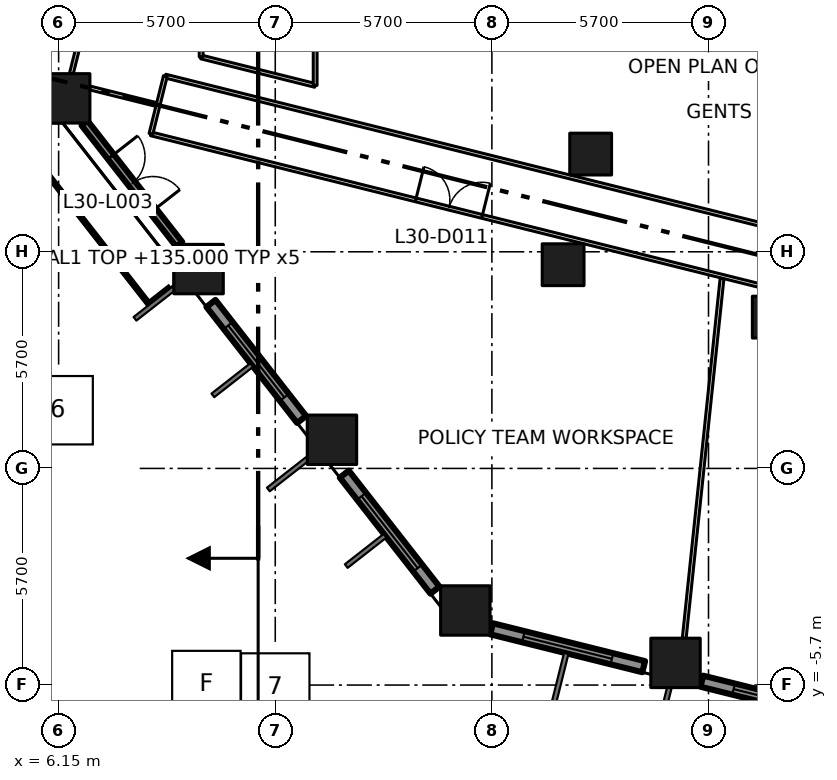
"""IFC4 building model, lengths in metres.
Left out: names, types, materials, properties, quantities, classifications, styles, units other than length and angle.
Written with IfcOpenShell. Run it as: python <this file> out.ifc"""

import sys

from ifc_helpers import new_model, si_unit, direction, frame, frame_2d, origin, origin_2d, place, context, subcontext, project, spatial, rectangle, extrude, element, fill, save


model = new_model("IFC4")
c1 = context("Model", 3, precision=1e-05, world=origin(), true_north=direction((0.0, 1.0)))
c2 = subcontext(c1, "Body", "Model", "MODEL_VIEW")
j1 = project(units=[si_unit("LENGTHUNIT", "METRE"), si_unit("PLANEANGLEUNIT", "RADIAN")], contexts=[c1])
p1 = place(None, origin())
s1 = spatial("IfcSite", under=j1, at=p1, CompositionType="ELEMENT")
p2 = place(p1, origin())
s2 = spatial("IfcBuilding", under=s1, at=p2, CompositionType="ELEMENT")
p3 = place(p2, frame((0.0, 0.0, 135.0)))
s3 = spatial("IfcBuildingStorey", under=s2, at=p3, CompositionType="ELEMENT", Elevation=135.0)
for number, where, z_axis, x_axis in (
    (1, (16.851, -3.738, 0.0), (0.0, 0.0, 1.0), (1.0, 0.0, 0.0)),
    (2, (13.342, 0.754, 0.0), (0.0, 0.0, 1.0), (1.0, 0.0, 0.0)),
    (3, (9.833, 5.245, 0.0), (0.0, 0.0, 1.0), (1.0, 0.0, 0.0)),
    (4, (6.323, 9.737, 0.0), (0.0, 0.0, 1.0), (1.0, 0.0, 0.0)),
    (5, (22.382, -5.117, 0.0), (0.0, 0.0, 1.0), (1.0, 0.0, 0.0)),
):
    element("IfcColumn", number, at=place(p3, frame(where, z_axis=z_axis, x_axis=x_axis)), inside=s3, PredefinedType="COLUMN", context=c2, shape_type="SweptSolid", body=[
        extrude(rectangle(XDim=1.3, YDim=1.3, at=origin_2d()), origin(), (0.0, 0.0, 1.0), 4.2),
    ])
for number, where, z_axis, x_axis in (
    (6, (19.424, 5.36, 0.0), (0.0, 0.0, 1.0), (1.0, 0.0, 0.0)),
    (7, (24.954, 3.981, 0.0), (0.0, 0.0, 1.0), (1.0, 0.0, 0.0)),
    (8, (20.149, 8.271, 0.0), (0.0, 0.0, 1.0), (1.0, 0.0, 0.0)),
):
    element("IfcColumn", number, at=place(p3, frame(where, z_axis=z_axis, x_axis=x_axis)), inside=s3, PredefinedType="COLUMN", context=c2, shape_type="SweptSolid", body=[
        extrude(rectangle(XDim=1.1, YDim=1.1, at=origin_2d()), origin(), (0.0, 0.0, 1.0), 4.2),
    ])
p4 = place(p3, frame((6.832, 9.087, 0.0), z_axis=(0.0, 0.0, 1.0), x_axis=(0.615529395526, -0.788113927833, 0.0)))
e9 = element("IfcWall", 9, at=p4, inside=s3, PredefinedType="SOLIDWALL", context=c2, shape_type="SweptSolid", body=[
    extrude(rectangle(XDim=4.05, YDim=0.2, at=frame_2d((2.025, 0.0))), origin(), (0.0, 0.0, 1.0), 3.1),
])
p5 = place(p4, frame((1.125, 0.0, 0.0)))
e10 = element("IfcOpeningElement", 10, at=p5, cuts=e9, PredefinedType="OPENING", context=c2, shape_type="SweptSolid", body=[
    extrude(rectangle(XDim=1.8, YDim=2.9, at=frame_2d((0.9, 1.45))), frame((0.0, 0.11, 0.0), z_axis=(0.0, -1.0, 0.0), x_axis=(1.0, 0.0, 0.0)), (0.0, 0.0, 1.0), 0.22),
])
p6 = place(p3, frame((10.158, 4.341, 0.0), z_axis=(0.0, 0.0, 1.0), x_axis=(0.615779754703, -0.787918329332, 0.0)))
e11 = element("IfcWall", 11, at=p6, inside=s3, PredefinedType="SOLIDWALL", context=c2, shape_type="SweptSolid", body=[
    extrude(rectangle(XDim=3.875, YDim=0.3, at=frame_2d((1.938, 0.0))), origin(), (0.0, 0.0, 1.0), 3.1),
])
p7 = place(p6, frame((0.737, 0.0, 0.8)))
e12 = element("IfcOpeningElement", 12, at=p7, cuts=e11, PredefinedType="OPENING", context=c2, shape_type="SweptSolid", body=[
    extrude(rectangle(XDim=2.4, YDim=2.1, at=frame_2d((1.2, 1.05))), frame((0.0, 0.16, 0.0), z_axis=(0.0, -1.0, 0.0), x_axis=(1.0, 0.0, 0.0)), (0.0, 0.0, 1.0), 0.32),
])
p8 = place(p3, frame((13.667, -0.15, 0.0), z_axis=(0.0, 0.0, 1.0), x_axis=(0.615626928003, -0.788037743714, 0.0)))
e13 = element("IfcWall", 13, at=p8, inside=s3, PredefinedType="SOLIDWALL", context=c2, shape_type="SweptSolid", body=[
    extrude(rectangle(XDim=3.876, YDim=0.3, at=frame_2d((1.938, 0.0))), origin(), (0.0, 0.0, 1.0), 3.1),
])
p9 = place(p8, frame((0.738, 0.0, 0.8)))
e14 = element("IfcOpeningElement", 14, at=p9, cuts=e13, PredefinedType="OPENING", context=c2, shape_type="SweptSolid", body=[
    extrude(rectangle(XDim=2.4, YDim=2.1, at=frame_2d((1.2, 1.05))), frame((0.0, 0.16, 0.0), z_axis=(0.0, -1.0, 0.0), x_axis=(1.0, 0.0, 0.0)), (0.0, 0.0, 1.0), 0.32),
])
p10 = place(p3, frame((17.543, -4.22, 0.0), z_axis=(0.0, 0.0, 1.0), x_axis=(0.970337184445, -0.241755555227, 0.0)))
e15 = element("IfcWall", 15, at=p10, inside=s3, PredefinedType="SOLIDWALL", context=c2, shape_type="SweptSolid", body=[
    extrude(rectangle(XDim=4.124, YDim=0.3, at=frame_2d((2.062, 0.0))), origin(), (0.0, 0.0, 1.0), 3.1),
])
p11 = place(p10, frame((0.862, 0.0, 0.8)))
e16 = element("IfcOpeningElement", 16, at=p11, cuts=e15, PredefinedType="OPENING", context=c2, shape_type="SweptSolid", body=[
    extrude(rectangle(XDim=2.4, YDim=2.1, at=frame_2d((1.2, 1.05))), frame((0.0, 0.16, 0.0), z_axis=(0.0, -1.0, 0.0), x_axis=(1.0, 0.0, 0.0)), (0.0, 0.0, 1.0), 0.32),
])
p12 = place(p3, frame((23.074, -5.598, 0.0), z_axis=(0.0, 0.0, 1.0), x_axis=(0.970267747908, -0.242034083076, 0.0)))
e17 = element("IfcWall", 17, at=p12, inside=s3, PredefinedType="SOLIDWALL", context=c2, shape_type="SweptSolid", body=[
    extrude(rectangle(XDim=4.124, YDim=0.3, at=frame_2d((2.062, 0.0))), origin(), (0.0, 0.0, 1.0), 3.1),
])
p13 = place(p12, frame((0.862, 0.0, 0.8)))
e18 = element("IfcOpeningElement", 18, at=p13, cuts=e17, PredefinedType="OPENING", context=c2, shape_type="SweptSolid", body=[
    extrude(rectangle(XDim=2.4, YDim=2.1, at=frame_2d((1.2, 1.05))), frame((0.0, 0.16, 0.0), z_axis=(0.0, -1.0, 0.0), x_axis=(1.0, 0.0, 0.0)), (0.0, 0.0, 1.0), 0.32),
])
p14 = place(p3, frame((8.579, 8.803, 0.0), z_axis=(0.0, 0.0, 1.0), x_axis=(0.970298569476, -0.241910491863, 0.0)))
e19 = element("IfcWall", 19, at=p14, inside=s3, PredefinedType="PARTITIONING", context=c2, shape_type="SweptSolid", body=[
    extrude(rectangle(XDim=62.676, YDim=0.1, at=frame_2d((31.338, 0.0))), origin(), (0.0, 0.0, 1.0), 3.9),
])
p15 = place(p14, frame((49.173, 0.0, 0.0)))
e20 = element("IfcOpeningElement", 20, at=p15, cuts=e19, PredefinedType="OPENING", context=c2, shape_type="SweptSolid", body=[
    extrude(rectangle(XDim=1.0, YDim=2.1, at=frame_2d((0.5, 1.05))), frame((0.0, 0.06, 0.0), z_axis=(0.0, -1.0, 0.0), x_axis=(1.0, 0.0, 0.0)), (0.0, 0.0, 1.0), 0.12),
])
p16 = place(p14, frame((19.873, 0.0, 0.0)))
e21 = element("IfcOpeningElement", 21, at=p16, cuts=e19, PredefinedType="OPENING", context=c2, shape_type="SweptSolid", body=[
    extrude(rectangle(XDim=1.8, YDim=2.1, at=frame_2d((0.9, 1.05))), frame((0.0, 0.06, 0.0), z_axis=(0.0, -1.0, 0.0), x_axis=(1.0, 0.0, 0.0)), (0.0, 0.0, 1.0), 0.12),
])
p17 = place(p14, frame((31.273, 0.0, 0.0)))
e22 = element("IfcOpeningElement", 22, at=p17, cuts=e19, PredefinedType="OPENING", context=c2, shape_type="SweptSolid", body=[
    extrude(rectangle(XDim=1.8, YDim=2.1, at=frame_2d((0.9, 1.05))), frame((0.0, 0.06, 0.0), z_axis=(0.0, -1.0, 0.0), x_axis=(1.0, 0.0, 0.0)), (0.0, 0.0, 1.0), 0.12),
])
p18 = place(p14, frame((7.18, 0.0, 0.0)))
e23 = element("IfcOpeningElement", 23, at=p18, cuts=e19, PredefinedType="OPENING", context=c2, shape_type="SweptSolid", body=[
    extrude(rectangle(XDim=1.8, YDim=2.1, at=frame_2d((0.9, 1.05))), frame((0.0, 0.06, 0.0), z_axis=(0.0, -1.0, 0.0), x_axis=(1.0, 0.0, 0.0)), (0.0, 0.0, 1.0), 0.12),
])
p19 = place(p3, frame((8.958, 10.323, 0.0), z_axis=(0.0, 0.0, 1.0), x_axis=(0.970298340477, -0.241911410372, 0.0)))
e24 = element("IfcWall", 24, at=p19, inside=s3, PredefinedType="PARTITIONING", context=c2, shape_type="SweptSolid", body=[
    extrude(rectangle(XDim=19.88, YDim=0.1, at=frame_2d((9.94, 0.0))), origin(), (0.0, 0.0, 1.0), 3.9),
])
p20 = place(p3, frame((8.958, 10.323, 0.0), z_axis=(0.0, 0.0, 1.0), x_axis=(-0.241875508386, -0.97030729073, 0.0)))
e25 = element("IfcWall", 25, at=p20, inside=s3, PredefinedType="PARTITIONING", context=c2, shape_type="SweptSolid", body=[
    extrude(rectangle(XDim=1.567, YDim=0.1, at=frame_2d((0.783, 0.0))), origin(), (0.0, 0.0, 1.0), 3.9),
])
p21 = place(p3, frame((9.9, 10.826, 0.0), z_axis=(0.0, 0.0, 1.0), x_axis=(0.970290953223, -0.241941038466, 0.0)))
e26 = element("IfcWall", 26, at=p21, inside=s3, PredefinedType="PARTITIONING", context=c2, shape_type="SweptSolid", body=[
    extrude(rectangle(XDim=3.092, YDim=0.1, at=frame_2d((1.546, 0.0))), origin(), (0.0, 0.0, 1.0), 3.9),
])
p22 = place(p3, frame((9.9, 12.2, 0.0), z_axis=(0.0, 0.0, 1.0), x_axis=(0.0, -1.0, 0.0)))
e27 = element("IfcWall", 27, at=p22, inside=s3, PredefinedType="PARTITIONING", context=c2, shape_type="SweptSolid", body=[
    extrude(rectangle(XDim=1.374, YDim=0.1, at=frame_2d((0.687, 0.0))), origin(), (0.0, 0.0, 1.0), 3.9),
])
p23 = place(p3, frame((12.9, 10.078, 0.0), z_axis=(0.0, 0.0, 1.0), x_axis=(0.0, 1.0, 0.0)))
e28 = element("IfcWall", 28, at=p23, inside=s3, PredefinedType="PARTITIONING", context=c2, shape_type="SweptSolid", body=[
    extrude(rectangle(XDim=4.022, YDim=0.1, at=frame_2d((2.011, 0.0))), origin(), (0.0, 0.0, 1.0), 3.9),
])
p24 = place(p23, frame((1.18, 0.0, 0.0)))
e29 = element("IfcOpeningElement", 29, at=p24, cuts=e28, PredefinedType="OPENING", context=c2, shape_type="SweptSolid", body=[
    extrude(rectangle(XDim=1.8, YDim=2.1, at=frame_2d((0.9, 1.05))), frame((0.0, 0.06, 0.0), z_axis=(0.0, -1.0, 0.0), x_axis=(1.0, 0.0, 0.0)), (0.0, 0.0, 1.0), 0.12),
])
p25 = place(p3, frame((6.922, 12.138, 0.0), z_axis=(0.0, 0.0, 1.0), x_axis=(-0.242153635337, -0.970237917674, 0.0)))
e30 = element("IfcWall", 30, at=p25, inside=s3, PredefinedType="PARTITIONING", context=c2, shape_type="SweptSolid", body=[
    extrude(rectangle(XDim=1.805, YDim=0.1, at=frame_2d((0.902, 0.0))), origin(), (0.0, 0.0, 1.0), 3.9),
])
p26 = place(p3, frame((8.719, 9.575, 0.0), z_axis=(0.0, 0.0, 1.0), x_axis=(-0.970333736057, 0.241769395645, 0.0)))
e31 = element("IfcWall", 31, at=p26, inside=s3, PredefinedType="PARTITIONING", context=c2, shape_type="SweptSolid", body=[
    extrude(rectangle(XDim=1.8, YDim=0.1, at=frame_2d((0.9, 0.0))), origin(), (0.0, 0.0, 1.0), 3.9),
])
p27 = place(p3, frame((22.611, -4.467, 0.0), z_axis=(0.0, 0.0, 1.0), x_axis=(0.104533890456, 0.994521324933, 0.0)))
e32 = element("IfcWall", 32, at=p27, inside=s3, PredefinedType="PARTITIONING", context=c2, shape_type="SweptSolid", body=[
    extrude(rectangle(XDim=9.517, YDim=0.1, at=frame_2d((4.759, 0.0))), origin(), (0.0, 0.0, 1.0), 3.9),
])
p28 = place(p5, origin())
e33 = element("IfcDoor", 33, at=p28, inside=s3, OperationType="DOUBLE_DOOR_SINGLE_SWING", PredefinedType="DOOR", context=c2, shape_type="SweptSolid", body=[
    extrude(rectangle(XDim=1.8, YDim=2.9, at=frame_2d((0.9, 1.45))), frame((0.0, 0.025, 0.0), z_axis=(0.0, -1.0, 0.0), x_axis=(1.0, 0.0, 0.0)), (0.0, 0.0, 1.0), 0.05),
])
fill(e10, e33)
p29 = place(p7, origin())
e34 = element("IfcWindow", 34, at=p29, inside=s3, PartitioningType="DOUBLE_PANEL_VERTICAL", PredefinedType="WINDOW", context=c2, shape_type="SweptSolid", body=[
    extrude(rectangle(XDim=2.4, YDim=2.1, at=frame_2d((1.2, 1.05))), frame((0.0, 0.03, 0.0), z_axis=(0.0, -1.0, 0.0), x_axis=(1.0, 0.0, 0.0)), (0.0, 0.0, 1.0), 0.06),
])
fill(e12, e34)
p30 = place(p9, origin())
e35 = element("IfcWindow", 35, at=p30, inside=s3, PartitioningType="DOUBLE_PANEL_VERTICAL", PredefinedType="WINDOW", context=c2, shape_type="SweptSolid", body=[
    extrude(rectangle(XDim=2.4, YDim=2.1, at=frame_2d((1.2, 1.05))), frame((0.0, 0.03, 0.0), z_axis=(0.0, -1.0, 0.0), x_axis=(1.0, 0.0, 0.0)), (0.0, 0.0, 1.0), 0.06),
])
fill(e14, e35)
p31 = place(p11, origin())
e36 = element("IfcWindow", 36, at=p31, inside=s3, PartitioningType="DOUBLE_PANEL_VERTICAL", PredefinedType="WINDOW", context=c2, shape_type="SweptSolid", body=[
    extrude(rectangle(XDim=2.4, YDim=2.1, at=frame_2d((1.2, 1.05))), frame((0.0, 0.03, 0.0), z_axis=(0.0, -1.0, 0.0), x_axis=(1.0, 0.0, 0.0)), (0.0, 0.0, 1.0), 0.06),
])
fill(e16, e36)
p32 = place(p13, origin())
e37 = element("IfcWindow", 37, at=p32, inside=s3, PartitioningType="DOUBLE_PANEL_VERTICAL", PredefinedType="WINDOW", context=c2, shape_type="SweptSolid", body=[
    extrude(rectangle(XDim=2.4, YDim=2.1, at=frame_2d((1.2, 1.05))), frame((0.0, 0.03, 0.0), z_axis=(0.0, -1.0, 0.0), x_axis=(1.0, 0.0, 0.0)), (0.0, 0.0, 1.0), 0.06),
])
fill(e18, e37)
p33 = place(p18, origin())
e38 = element("IfcDoor", 38, at=p33, inside=s3, OperationType="DOUBLE_DOOR_SINGLE_SWING", PredefinedType="DOOR", context=c2, shape_type="SweptSolid", body=[
    extrude(rectangle(XDim=1.8, YDim=2.1, at=frame_2d((0.9, 1.05))), frame((0.0, 0.025, 0.0), z_axis=(0.0, -1.0, 0.0), x_axis=(1.0, 0.0, 0.0)), (0.0, 0.0, 1.0), 0.05),
])
fill(e23, e38)
save(model, sys.argv[1])
